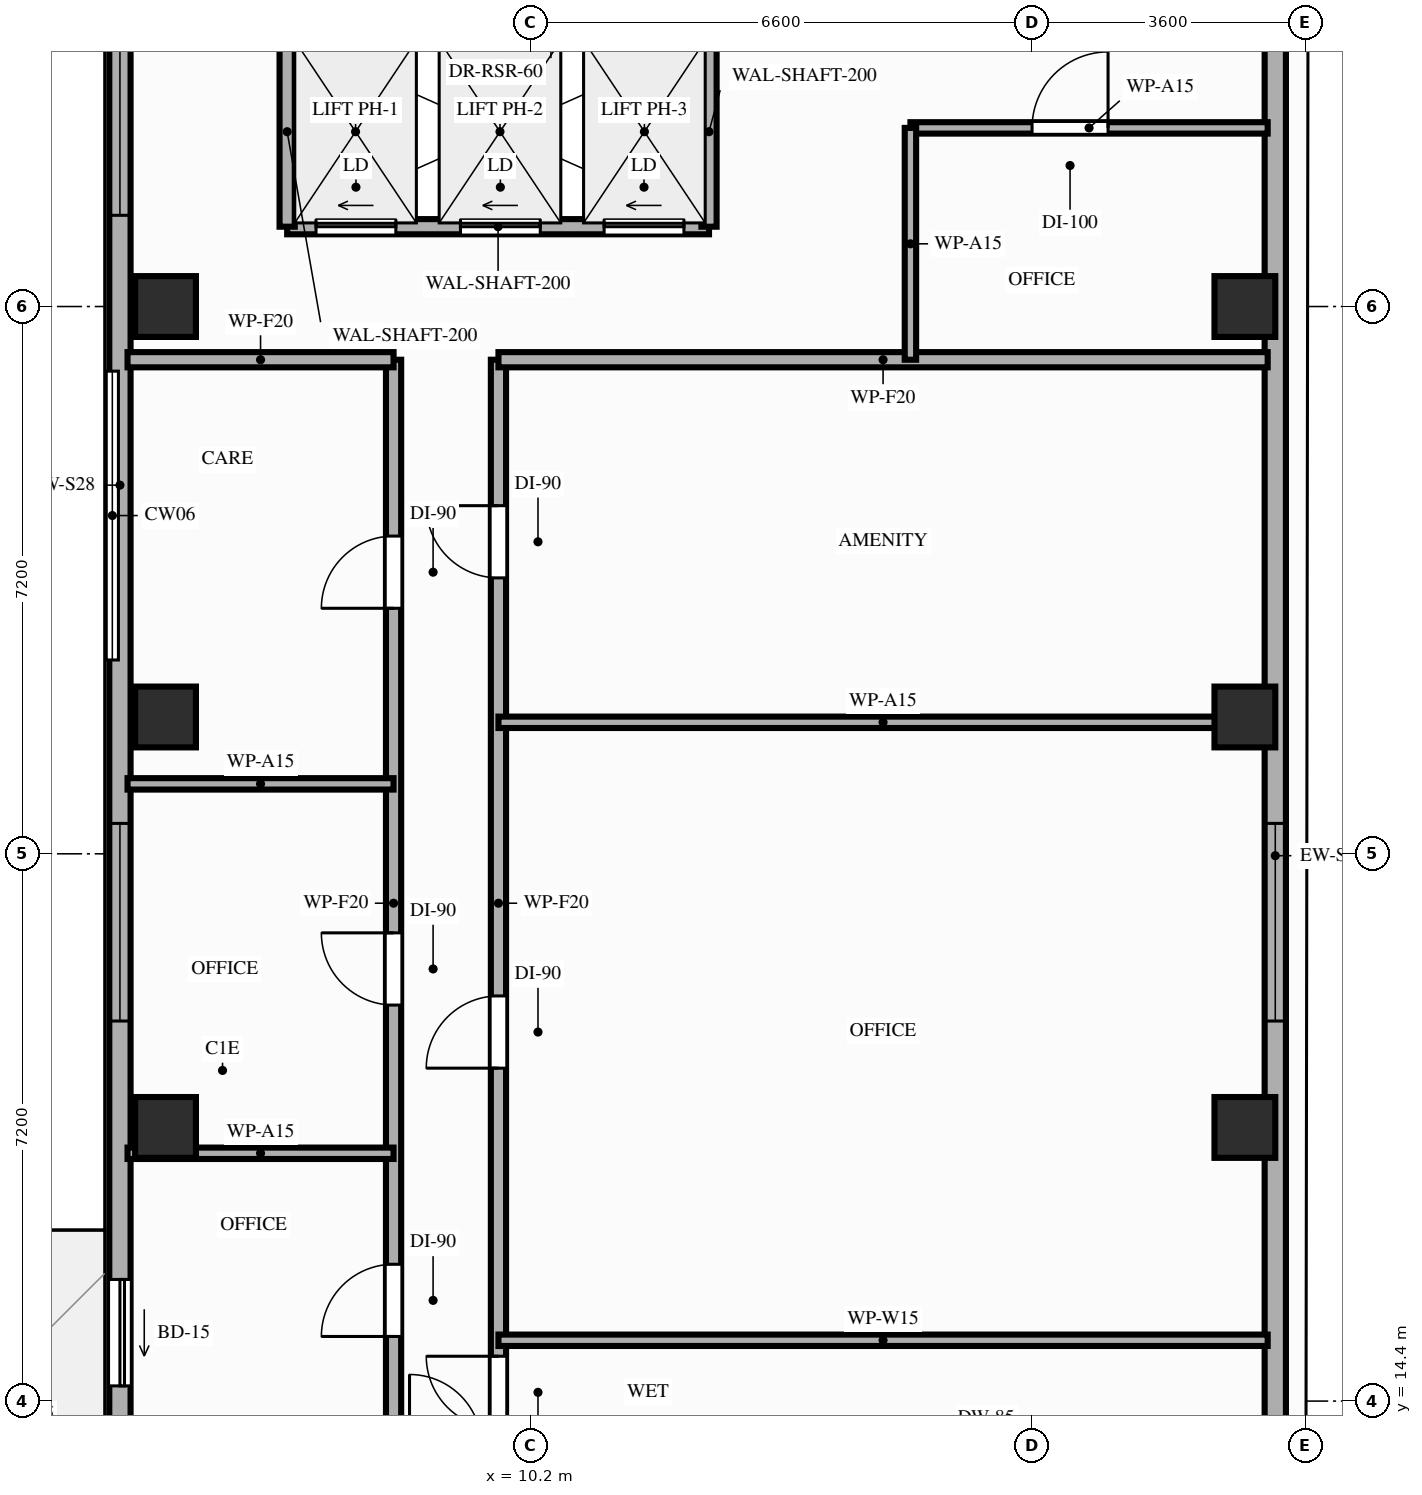
"""IFC4 building model, lengths in metres.
Left out: names, types, materials, properties, quantities, classifications, styles, units other than length and angle.
Written with IfcOpenShell. Run it as: python <this file> out.ifc"""

import sys

from ifc_helpers import new_model, si_unit, direction, frame, frame_2d, origin, origin_2d, place, context, subcontext, project, spatial, rectangle, extrude, element, fill, save


model = new_model("IFC4")
c1 = context("Model", 3, precision=1e-05, world=origin(), true_north=direction((0.0, 1.0)))
c2 = subcontext(c1, "Body", "Model", "MODEL_VIEW")
j1 = project(units=[si_unit("LENGTHUNIT", "METRE"), si_unit("PLANEANGLEUNIT", "RADIAN")], contexts=[c1])
p1 = place(None, origin())
s1 = spatial("IfcSite", under=j1, at=p1, CompositionType="ELEMENT")
p2 = place(p1, origin())
s2 = spatial("IfcBuilding", under=s1, at=p2, CompositionType="ELEMENT")
p3 = place(p2, frame((0.0, 0.0, 244.0)))
s3 = spatial("IfcBuildingStorey", under=s2, at=p3, CompositionType="ELEMENT", Elevation=244.0)
for number, where, z_axis, x_axis in (
    (1, (5.4, 18.0, 0.0), (0.0, 0.0, 1.0), (1.0, 0.0, 0.0)),
    (2, (19.6, 18.0, 0.0), (0.0, 0.0, 1.0), (1.0, 0.0, 0.0)),
    (3, (5.4, 23.4, 0.0), (0.0, 0.0, 1.0), (1.0, 0.0, 0.0)),
    (4, (19.6, 23.4, 0.0), (0.0, 0.0, 1.0), (1.0, 0.0, 0.0)),
    (5, (5.4, 28.8, 0.0), (0.0, 0.0, 1.0), (1.0, 0.0, 0.0)),
    (6, (19.6, 28.8, 0.0), (0.0, 0.0, 1.0), (1.0, 0.0, 0.0)),
):
    element("IfcColumn", number, at=place(p3, frame(where, z_axis=z_axis, x_axis=x_axis)), inside=s3, PredefinedType="COLUMN", context=c2, shape_type="SweptSolid", body=[
        extrude(rectangle(XDim=0.8, YDim=0.8, at=origin_2d()), origin(), (0.0, 0.0, 1.0), 3.2),
    ])
p4 = place(p3, frame((4.8, 42.1, 0.0), z_axis=(0.0, 0.0, 1.0), x_axis=(0.0, -1.0, 0.0)))
e7 = element("IfcWall", 7, at=p4, inside=s3, PredefinedType="STANDARD", context=c2, shape_type="SweptSolid", body=[
    extrude(rectangle(XDim=31.3, YDim=0.28, at=frame_2d((15.65, 0.0))), origin(), (0.0, 0.0, 1.0), 2.71),
])
p5 = place(p4, frame((26.1, 0.0, 0.0)))
e8 = element("IfcOpeningElement", 8, at=p5, cuts=e7, PredefinedType="OPENING", context=c2, shape_type="SweptSolid", body=[
    extrude(rectangle(XDim=1.4, YDim=2.1, at=frame_2d((0.7, 1.05))), frame((0.0, 0.15, 0.0), z_axis=(0.0, -1.0, 0.0), x_axis=(1.0, 0.0, 0.0)), (0.0, 0.0, 1.0), 0.3),
])
p6 = place(p4, frame((20.1, 0.0, 0.85)))
e9 = element("IfcOpeningElement", 9, at=p6, cuts=e7, PredefinedType="OPENING", context=c2, shape_type="SweptSolid", body=[
    extrude(rectangle(XDim=2.6, YDim=1.61, at=frame_2d((1.3, 0.805))), frame((0.0, 0.15, 0.0), z_axis=(0.0, -1.0, 0.0), x_axis=(1.0, 0.0, 0.0)), (0.0, 0.0, 1.0), 0.3),
])
p7 = place(p4, frame((9.5, 0.0, 0.85)))
e10 = element("IfcOpeningElement", 10, at=p7, cuts=e7, PredefinedType="OPENING", context=c2, shape_type="SweptSolid", body=[
    extrude(rectangle(XDim=2.6, YDim=1.61, at=frame_2d((1.3, 0.805))), frame((0.0, 0.15, 0.0), z_axis=(0.0, -1.0, 0.0), x_axis=(1.0, 0.0, 0.0)), (0.0, 0.0, 1.0), 0.3),
])
p8 = place(p4, frame((3.4, 0.0, 0.85)))
e11 = element("IfcOpeningElement", 11, at=p8, cuts=e7, PredefinedType="OPENING", context=c2, shape_type="SweptSolid", body=[
    extrude(rectangle(XDim=2.6, YDim=1.61, at=frame_2d((1.3, 0.805))), frame((0.0, 0.15, 0.0), z_axis=(0.0, -1.0, 0.0), x_axis=(1.0, 0.0, 0.0)), (0.0, 0.0, 1.0), 0.3),
])
p9 = place(p3, frame((20.0, 10.8, 0.0), z_axis=(0.0, 0.0, 1.0), x_axis=(0.0, 1.0, 0.0)))
e12 = element("IfcWall", 12, at=p9, inside=s3, PredefinedType="STANDARD", context=c2, shape_type="SweptSolid", body=[
    extrude(rectangle(XDim=21.55, YDim=0.28, at=frame_2d((10.775, 0.0))), origin(), (0.0, 0.0, 1.0), 2.56),
])
p10 = place(p9, frame((8.6, 0.0, 0.85)))
e13 = element("IfcOpeningElement", 13, at=p10, cuts=e12, PredefinedType="OPENING", context=c2, shape_type="SweptSolid", body=[
    extrude(rectangle(XDim=2.6, YDim=1.46, at=frame_2d((1.3, 0.73))), frame((0.0, 0.15, 0.0), z_axis=(0.0, -1.0, 0.0), x_axis=(1.0, 0.0, 0.0)), (0.0, 0.0, 1.0), 0.3),
])
p11 = place(p3, frame((7.0, 29.85, 0.0), z_axis=(0.0, 0.0, 1.0), x_axis=(1.0, 0.0, 0.0)))
e14 = element("IfcWall", 14, at=p11, inside=s3, PredefinedType="MOVABLE", context=c2, shape_type="SweptSolid", body=[
    extrude(rectangle(XDim=5.55, YDim=0.2, at=frame_2d((2.775, 0.0))), origin(), (0.0, 0.0, 1.0), 3.02),
])
p12 = place(p11, frame((0.38, 0.0, 0.0)))
e15 = element("IfcOpeningElement", 15, at=p12, cuts=e14, PredefinedType="OPENING", context=c2, shape_type="SweptSolid", body=[
    extrude(rectangle(XDim=1.05, YDim=2.15, at=frame_2d((0.525, 1.075))), frame((0.0, 0.11, 0.0), z_axis=(0.0, -1.0, 0.0), x_axis=(1.0, 0.0, 0.0)), (0.0, 0.0, 1.0), 0.22),
])
p13 = place(p11, frame((2.28, 0.0, 0.0)))
e16 = element("IfcOpeningElement", 16, at=p13, cuts=e14, PredefinedType="OPENING", context=c2, shape_type="SweptSolid", body=[
    extrude(rectangle(XDim=1.05, YDim=2.15, at=frame_2d((0.525, 1.075))), frame((0.0, 0.11, 0.0), z_axis=(0.0, -1.0, 0.0), x_axis=(1.0, 0.0, 0.0)), (0.0, 0.0, 1.0), 0.22),
])
p14 = place(p11, frame((4.17, 0.0, 0.0)))
e17 = element("IfcOpeningElement", 17, at=p14, cuts=e14, PredefinedType="OPENING", context=c2, shape_type="SweptSolid", body=[
    extrude(rectangle(XDim=1.05, YDim=2.15, at=frame_2d((0.525, 1.075))), frame((0.0, 0.11, 0.0), z_axis=(0.0, -1.0, 0.0), x_axis=(1.0, 0.0, 0.0)), (0.0, 0.0, 1.0), 0.22),
])
for number, where, z_axis, x_axis in (
    (18, (7.0, 29.85, 0.0), (0.0, 0.0, 1.0), (0.0, 1.0, 0.0)),
    (19, (12.55, 29.85, 0.0), (0.0, 0.0, 1.0), (0.0, 1.0, 0.0)),
):
    element("IfcWall", number, at=place(p3, frame(where, z_axis=z_axis, x_axis=x_axis)), inside=s3, PredefinedType="MOVABLE", context=c2, shape_type="SweptSolid", body=[
        extrude(rectangle(XDim=2.5, YDim=0.2, at=frame_2d((1.25, 0.0))), origin(), (0.0, 0.0, 1.0), 3.02),
    ])
p15 = place(p3, frame((8.4, 13.8, 0.0), z_axis=(0.0, 0.0, 1.0), x_axis=(0.0, 1.0, 0.0)))
e20 = element("IfcWall", 20, at=p15, inside=s3, PredefinedType="PARTITIONING", context=c2, shape_type="SweptSolid", body=[
    extrude(rectangle(XDim=14.3, YDim=0.2, at=frame_2d((7.15, 0.0))), origin(), (0.0, 0.0, 1.0), 2.56),
])
p16 = place(p15, frame((1.45, 0.0, 0.0)))
e21 = element("IfcOpeningElement", 21, at=p16, cuts=e20, PredefinedType="OPENING", context=c2, shape_type="SweptSolid", body=[
    extrude(rectangle(XDim=0.95, YDim=2.15, at=frame_2d((0.475, 1.075))), frame((0.0, 0.11, 0.0), z_axis=(0.0, -1.0, 0.0), x_axis=(1.0, 0.0, 0.0)), (0.0, 0.0, 1.0), 0.22),
])
p17 = place(p15, frame((5.81, 0.0, 0.0)))
e22 = element("IfcOpeningElement", 22, at=p17, cuts=e20, PredefinedType="OPENING", context=c2, shape_type="SweptSolid", body=[
    extrude(rectangle(XDim=0.95, YDim=2.15, at=frame_2d((0.475, 1.075))), frame((0.0, 0.11, 0.0), z_axis=(0.0, -1.0, 0.0), x_axis=(1.0, 0.0, 0.0)), (0.0, 0.0, 1.0), 0.22),
])
p18 = place(p15, frame((11.03, 0.0, 0.0)))
e23 = element("IfcOpeningElement", 23, at=p18, cuts=e20, PredefinedType="OPENING", context=c2, shape_type="SweptSolid", body=[
    extrude(rectangle(XDim=0.95, YDim=2.15, at=frame_2d((0.475, 1.075))), frame((0.0, 0.11, 0.0), z_axis=(0.0, -1.0, 0.0), x_axis=(1.0, 0.0, 0.0)), (0.0, 0.0, 1.0), 0.22),
])
p19 = place(p3, frame((9.78, 13.8, 0.0), z_axis=(0.0, 0.0, 1.0), x_axis=(0.0, 1.0, 0.0)))
e24 = element("IfcWall", 24, at=p19, inside=s3, PredefinedType="PARTITIONING", context=c2, shape_type="SweptSolid", body=[
    extrude(rectangle(XDim=14.3, YDim=0.2, at=frame_2d((7.15, 0.0))), origin(), (0.0, 0.0, 1.0), 2.56),
])
p20 = place(p19, frame((0.24, 0.0, 0.0)))
e25 = element("IfcOpeningElement", 25, at=p20, cuts=e24, PredefinedType="OPENING", context=c2, shape_type="SweptSolid", body=[
    extrude(rectangle(XDim=0.95, YDim=2.1, at=frame_2d((0.475, 1.05))), frame((0.0, 0.11, 0.0), z_axis=(0.0, -1.0, 0.0), x_axis=(1.0, 0.0, 0.0)), (0.0, 0.0, 1.0), 0.22),
])
p21 = place(p19, frame((4.98, 0.0, 0.0)))
e26 = element("IfcOpeningElement", 26, at=p21, cuts=e24, PredefinedType="OPENING", context=c2, shape_type="SweptSolid", body=[
    extrude(rectangle(XDim=0.95, YDim=2.15, at=frame_2d((0.475, 1.075))), frame((0.0, 0.11, 0.0), z_axis=(0.0, -1.0, 0.0), x_axis=(1.0, 0.0, 0.0)), (0.0, 0.0, 1.0), 0.22),
])
p22 = place(p19, frame((11.43, 0.0, 0.0)))
e27 = element("IfcOpeningElement", 27, at=p22, cuts=e24, PredefinedType="OPENING", context=c2, shape_type="SweptSolid", body=[
    extrude(rectangle(XDim=0.95, YDim=2.15, at=frame_2d((0.475, 1.075))), frame((0.0, 0.11, 0.0), z_axis=(0.0, -1.0, 0.0), x_axis=(1.0, 0.0, 0.0)), (0.0, 0.0, 1.0), 0.22),
])
p23 = place(p3, frame((4.9, 28.1, 0.0), z_axis=(0.0, 0.0, 1.0), x_axis=(1.0, 0.0, 0.0)))
e28 = element("IfcWall", 28, at=p23, inside=s3, PredefinedType="PARTITIONING", context=c2, shape_type="SweptSolid", body=[
    extrude(rectangle(XDim=3.5, YDim=0.2, at=frame_2d((1.75, 0.0))), origin(), (0.0, 0.0, 1.0), 2.56),
])
p24 = place(p3, frame((9.78, 28.1, 0.0), z_axis=(0.0, 0.0, 1.0), x_axis=(1.0, 0.0, 0.0)))
e29 = element("IfcWall", 29, at=p24, inside=s3, PredefinedType="PARTITIONING", context=c2, shape_type="SweptSolid", body=[
    extrude(rectangle(XDim=10.12, YDim=0.2, at=frame_2d((5.06, 0.0))), origin(), (0.0, 0.0, 1.0), 2.56),
])
p25 = place(p3, frame((15.2, 31.15, 0.0), z_axis=(0.0, 0.0, 1.0), x_axis=(1.0, 0.0, 0.0)))
e30 = element("IfcWall", 30, at=p25, inside=s3, PredefinedType="PARTITIONING", context=c2, shape_type="SweptSolid", body=[
    extrude(rectangle(XDim=4.7, YDim=0.15, at=frame_2d((2.35, 0.0))), origin(), (0.0, 0.0, 1.0), 2.56),
])
p26 = place(p25, frame((1.6, 0.0, 0.0)))
e31 = element("IfcOpeningElement", 31, at=p26, cuts=e30, PredefinedType="OPENING", context=c2, shape_type="SweptSolid", body=[
    extrude(rectangle(XDim=1.0, YDim=2.15, at=frame_2d((0.5, 1.075))), frame((0.0, 0.085, 0.0), z_axis=(0.0, -1.0, 0.0), x_axis=(1.0, 0.0, 0.0)), (0.0, 0.0, 1.0), 0.17),
])
p27 = place(p3, frame((15.2, 28.1, 0.0), z_axis=(0.0, 0.0, 1.0), x_axis=(0.0, 1.0, 0.0)))
e32 = element("IfcWall", 32, at=p27, inside=s3, PredefinedType="PARTITIONING", context=c2, shape_type="SweptSolid", body=[
    extrude(rectangle(XDim=3.05, YDim=0.15, at=frame_2d((1.525, 0.0))), origin(), (0.0, 0.0, 1.0), 2.56),
])
for number, where, z_axis, x_axis in (
    (33, (4.9, 17.66, 0.0), (0.0, 0.0, 1.0), (1.0, 0.0, 0.0)),
    (34, (4.9, 22.52, 0.0), (0.0, 0.0, 1.0), (1.0, 0.0, 0.0)),
):
    element("IfcWall", number, at=place(p3, frame(where, z_axis=z_axis, x_axis=x_axis)), inside=s3, PredefinedType="PARTITIONING", context=c2, shape_type="SweptSolid", body=[
        extrude(rectangle(XDim=3.5, YDim=0.15, at=frame_2d((1.75, 0.0))), origin(), (0.0, 0.0, 1.0), 2.56),
    ])
for number, where, z_axis, x_axis in (
    (35, (9.78, 15.2, 0.0), (0.0, 0.0, 1.0), (1.0, 0.0, 0.0)),
    (36, (9.78, 23.33, 0.0), (0.0, 0.0, 1.0), (1.0, 0.0, 0.0)),
):
    element("IfcWall", number, at=place(p3, frame(where, z_axis=z_axis, x_axis=x_axis)), inside=s3, PredefinedType="PARTITIONING", context=c2, shape_type="SweptSolid", body=[
        extrude(rectangle(XDim=10.12, YDim=0.15, at=frame_2d((5.06, 0.0))), origin(), (0.0, 0.0, 1.0), 2.56),
    ])
p28 = place(p5, origin())
e37 = element("IfcDoor", 37, at=p28, inside=s3, OperationType="SLIDING_TO_RIGHT", PredefinedType="DOOR", context=c2, shape_type="SweptSolid", body=[
    extrude(rectangle(XDim=1.4, YDim=2.1, at=frame_2d((0.7, 1.05))), frame((0.0, 0.025, 0.0), z_axis=(0.0, -1.0, 0.0), x_axis=(1.0, 0.0, 0.0)), (0.0, 0.0, 1.0), 0.05),
])
fill(e8, e37)
p29 = place(p6, origin())
e38 = element("IfcWindow", 38, at=p29, inside=s3, PartitioningType="SINGLE_PANEL", PredefinedType="WINDOW", context=c2, shape_type="SweptSolid", body=[
    extrude(rectangle(XDim=2.6, YDim=1.61, at=frame_2d((1.3, 0.805))), frame((0.0, 0.03, 0.0), z_axis=(0.0, -1.0, 0.0), x_axis=(1.0, 0.0, 0.0)), (0.0, 0.0, 1.0), 0.06),
])
fill(e9, e38)
p30 = place(p7, origin())
e39 = element("IfcWindow", 39, at=p30, inside=s3, PartitioningType="SINGLE_PANEL", PredefinedType="WINDOW", context=c2, shape_type="SweptSolid", body=[
    extrude(rectangle(XDim=2.6, YDim=1.61, at=frame_2d((1.3, 0.805))), frame((0.0, 0.03, 0.0), z_axis=(0.0, -1.0, 0.0), x_axis=(1.0, 0.0, 0.0)), (0.0, 0.0, 1.0), 0.06),
])
fill(e10, e39)
p31 = place(p10, origin())
e40 = element("IfcWindow", 40, at=p31, inside=s3, PartitioningType="SINGLE_PANEL", PredefinedType="WINDOW", context=c2, shape_type="SweptSolid", body=[
    extrude(rectangle(XDim=2.6, YDim=1.46, at=frame_2d((1.3, 0.73))), frame((0.0, 0.03, 0.0), z_axis=(0.0, -1.0, 0.0), x_axis=(1.0, 0.0, 0.0)), (0.0, 0.0, 1.0), 0.06),
])
fill(e13, e40)
p32 = place(p12, origin())
e41 = element("IfcDoor", 41, at=p32, inside=s3, OperationType="SLIDING_TO_LEFT", PredefinedType="DOOR", context=c2, shape_type="SweptSolid", body=[
    extrude(rectangle(XDim=1.05, YDim=2.15, at=frame_2d((0.525, 1.075))), frame((0.0, 0.025, 0.0), z_axis=(0.0, -1.0, 0.0), x_axis=(1.0, 0.0, 0.0)), (0.0, 0.0, 1.0), 0.05),
])
fill(e15, e41)
p33 = place(p13, origin())
e42 = element("IfcDoor", 42, at=p33, inside=s3, OperationType="SLIDING_TO_LEFT", PredefinedType="DOOR", context=c2, shape_type="SweptSolid", body=[
    extrude(rectangle(XDim=1.05, YDim=2.15, at=frame_2d((0.525, 1.075))), frame((0.0, 0.025, 0.0), z_axis=(0.0, -1.0, 0.0), x_axis=(1.0, 0.0, 0.0)), (0.0, 0.0, 1.0), 0.05),
])
fill(e16, e42)
p34 = place(p14, origin())
e43 = element("IfcDoor", 43, at=p34, inside=s3, OperationType="SLIDING_TO_LEFT", PredefinedType="DOOR", context=c2, shape_type="SweptSolid", body=[
    extrude(rectangle(XDim=1.05, YDim=2.15, at=frame_2d((0.525, 1.075))), frame((0.0, 0.025, 0.0), z_axis=(0.0, -1.0, 0.0), x_axis=(1.0, 0.0, 0.0)), (0.0, 0.0, 1.0), 0.05),
])
fill(e17, e43)
p35 = place(p26, origin())
e44 = element("IfcDoor", 44, at=p35, inside=s3, OperationType="SINGLE_SWING_RIGHT", PredefinedType="DOOR", context=c2, shape_type="SweptSolid", body=[
    extrude(rectangle(XDim=1.0, YDim=2.15, at=frame_2d((0.5, 1.075))), frame((0.0, 0.025, 0.0), z_axis=(0.0, -1.0, 0.0), x_axis=(1.0, 0.0, 0.0)), (0.0, 0.0, 1.0), 0.05),
])
fill(e31, e44)
p36 = place(p16, origin())
e45 = element("IfcDoor", 45, at=p36, inside=s3, OperationType="SINGLE_SWING_LEFT", PredefinedType="DOOR", context=c2, shape_type="SweptSolid", body=[
    extrude(rectangle(XDim=0.95, YDim=2.15, at=frame_2d((0.475, 1.075))), frame((0.0, 0.025, 0.0), z_axis=(0.0, -1.0, 0.0), x_axis=(1.0, 0.0, 0.0)), (0.0, 0.0, 1.0), 0.05),
])
fill(e21, e45)
p37 = place(p17, origin())
e46 = element("IfcDoor", 46, at=p37, inside=s3, OperationType="SINGLE_SWING_RIGHT", PredefinedType="DOOR", context=c2, shape_type="SweptSolid", body=[
    extrude(rectangle(XDim=0.95, YDim=2.15, at=frame_2d((0.475, 1.075))), frame((0.0, 0.025, 0.0), z_axis=(0.0, -1.0, 0.0), x_axis=(1.0, 0.0, 0.0)), (0.0, 0.0, 1.0), 0.05),
])
fill(e22, e46)
p38 = place(p18, origin())
e47 = element("IfcDoor", 47, at=p38, inside=s3, OperationType="SINGLE_SWING_LEFT", PredefinedType="DOOR", context=c2, shape_type="SweptSolid", body=[
    extrude(rectangle(XDim=0.95, YDim=2.15, at=frame_2d((0.475, 1.075))), frame((0.0, 0.025, 0.0), z_axis=(0.0, -1.0, 0.0), x_axis=(1.0, 0.0, 0.0)), (0.0, 0.0, 1.0), 0.05),
])
fill(e23, e47)
p39 = place(p20, origin())
e48 = element("IfcDoor", 48, at=p39, inside=s3, OperationType="SINGLE_SWING_RIGHT", PredefinedType="DOOR", context=c2, shape_type="SweptSolid", body=[
    extrude(rectangle(XDim=0.95, YDim=2.1, at=frame_2d((0.475, 1.05))), frame((0.0, 0.025, 0.0), z_axis=(0.0, -1.0, 0.0), x_axis=(1.0, 0.0, 0.0)), (0.0, 0.0, 1.0), 0.05),
])
fill(e25, e48)
p40 = place(p21, origin())
e49 = element("IfcDoor", 49, at=p40, inside=s3, OperationType="SINGLE_SWING_LEFT", PredefinedType="DOOR", context=c2, shape_type="SweptSolid", body=[
    extrude(rectangle(XDim=0.95, YDim=2.15, at=frame_2d((0.475, 1.075))), frame((0.0, 0.025, 0.0), z_axis=(0.0, -1.0, 0.0), x_axis=(1.0, 0.0, 0.0)), (0.0, 0.0, 1.0), 0.05),
])
fill(e26, e49)
p41 = place(p22, origin())
e50 = element("IfcDoor", 50, at=p41, inside=s3, OperationType="SINGLE_SWING_RIGHT", PredefinedType="DOOR", context=c2, shape_type="SweptSolid", body=[
    extrude(rectangle(XDim=0.95, YDim=2.15, at=frame_2d((0.475, 1.075))), frame((0.0, 0.025, 0.0), z_axis=(0.0, -1.0, 0.0), x_axis=(1.0, 0.0, 0.0)), (0.0, 0.0, 1.0), 0.05),
])
fill(e27, e50)
save(model, sys.argv[1])
